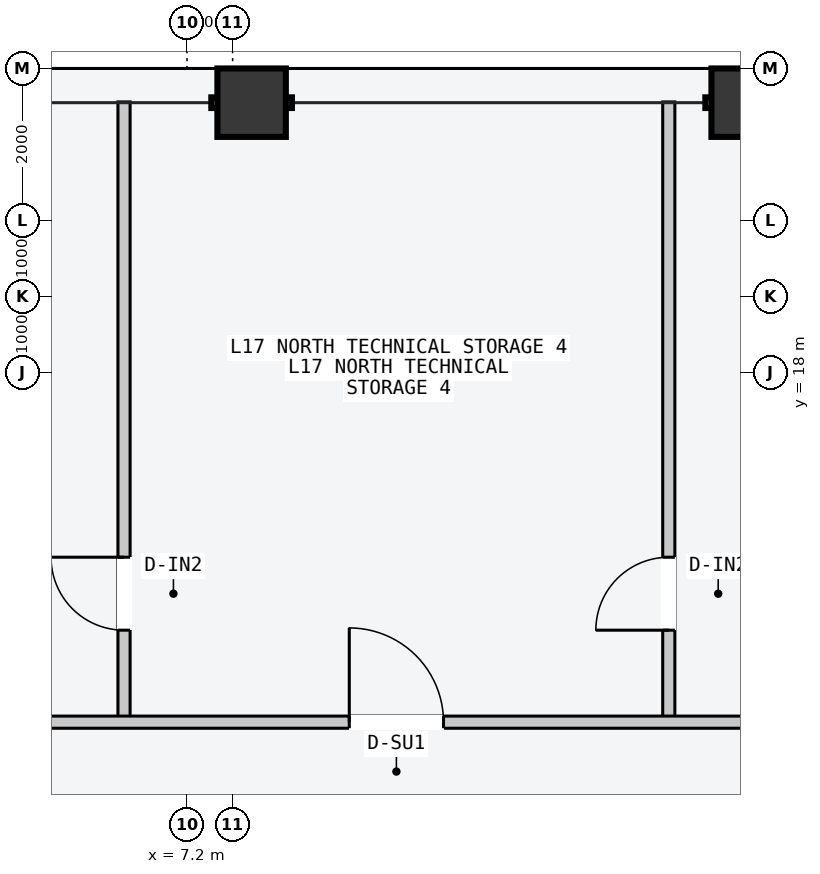
"""IFC4 building model, lengths in metres.
Left out: names, types, materials, properties, quantities, classifications, styles, units other than length and angle.
Written with IfcOpenShell. Run it as: python <this file> out.ifc"""

import sys

from ifc_helpers import new_model, si_unit, direction, frame, frame_2d, origin, origin_2d, place, context, subcontext, project, spatial, rectangle, hollow_rectangle, extrude, element, fill, save


model = new_model("IFC4")
c1 = context("Model", 3, precision=1e-05, world=origin(), true_north=direction((0.0, 1.0)))
c2 = subcontext(c1, "Body", "Model", "MODEL_VIEW")
j1 = project(units=[si_unit("LENGTHUNIT", "METRE"), si_unit("PLANEANGLEUNIT", "RADIAN")], contexts=[c1])
p1 = place(None, origin())
s1 = spatial("IfcSite", under=j1, at=p1, CompositionType="ELEMENT")
p2 = place(p1, origin())
s2 = spatial("IfcBuilding", under=s1, at=p2, CompositionType="ELEMENT")
p3 = place(p2, frame((0.0, 0.0, 67.2)))
s3 = spatial("IfcBuildingStorey", under=s2, at=p3, CompositionType="ELEMENT", Elevation=67.2)
for number, where, z_axis, x_axis in (
    (1, (8.05, 21.55, 0.0), (0.0, 0.0, 1.0), (1.0, 0.0, 0.0)),
    (2, (14.55, 21.55, 0.0), (0.0, 0.0, 1.0), (1.0, 0.0, 0.0)),
):
    element("IfcColumn", number, at=place(p3, frame(where, z_axis=z_axis, x_axis=x_axis)), inside=s3, PredefinedType="COLUMN", context=c2, shape_type="SweptSolid", body=[
        extrude(hollow_rectangle(XDim=0.9, YDim=0.9, WallThickness=0.045, at=origin_2d()), origin(), (0.0, 0.0, 1.0), 3.6),
    ])
p4 = place(p3, frame((6.371, 13.46, 0.0), z_axis=(0.0, 0.0, 1.0), x_axis=(0.0, 1.0, 0.0)))
e3 = element("IfcWall", 3, at=p4, inside=s3, PredefinedType="PARTITIONING", context=c2, shape_type="SweptSolid", body=[
    extrude(rectangle(XDim=8.1, YDim=0.16, at=frame_2d((4.05, 0.0))), origin(), (0.0, 0.0, 1.0), 3.4),
])
p5 = place(p4, frame((1.15, 0.0, 0.0)))
e4 = element("IfcOpeningElement", 4, at=p5, cuts=e3, PredefinedType="OPENING", context=c2, shape_type="SweptSolid", body=[
    extrude(rectangle(XDim=0.96, YDim=2.18, at=frame_2d((0.48, 1.09))), frame((0.0, 0.09, 0.0), z_axis=(0.0, -1.0, 0.0), x_axis=(1.0, 0.0, 0.0)), (0.0, 0.0, 1.0), 0.18),
])
p6 = place(p3, frame((13.539, 13.46, 0.0), z_axis=(0.0, 0.0, 1.0), x_axis=(0.0, 1.0, 0.0)))
e5 = element("IfcWall", 5, at=p6, inside=s3, PredefinedType="PARTITIONING", context=c2, shape_type="SweptSolid", body=[
    extrude(rectangle(XDim=8.1, YDim=0.16, at=frame_2d((4.05, 0.0))), origin(), (0.0, 0.0, 1.0), 3.4),
])
p7 = place(p6, frame((1.15, 0.0, 0.0)))
e6 = element("IfcOpeningElement", 6, at=p7, cuts=e5, PredefinedType="OPENING", context=c2, shape_type="SweptSolid", body=[
    extrude(rectangle(XDim=0.96, YDim=2.18, at=frame_2d((0.48, 1.09))), frame((0.0, 0.09, 0.0), z_axis=(0.0, -1.0, 0.0), x_axis=(1.0, 0.0, 0.0)), (0.0, 0.0, 1.0), 0.18),
])
p8 = place(p3, frame((-19.2, 13.4, 0.0), z_axis=(0.0, 0.0, 1.0), x_axis=(1.0, 0.0, 0.0)))
e7 = element("IfcWall", 7, at=p8, inside=s3, PredefinedType="PARTITIONING", context=c2, shape_type="SweptSolid", body=[
    extrude(rectangle(XDim=38.4, YDim=0.16, at=frame_2d((19.2, 0.0))), origin(), (0.0, 0.0, 1.0), 3.4),
])
p9 = place(p8, frame((4.143, 0.0, 0.0)))
e8 = element("IfcOpeningElement", 8, at=p9, cuts=e7, PredefinedType="OPENING", context=c2, shape_type="SweptSolid", body=[
    extrude(rectangle(XDim=0.96, YDim=2.18, at=frame_2d((0.48, 1.09))), frame((0.0, 0.09, 0.0), z_axis=(0.0, -1.0, 0.0), x_axis=(1.0, 0.0, 0.0)), (0.0, 0.0, 1.0), 0.18),
])
p10 = place(p8, frame((13.115, 0.0, 0.0)))
e9 = element("IfcOpeningElement", 9, at=p10, cuts=e7, PredefinedType="OPENING", context=c2, shape_type="SweptSolid", body=[
    extrude(rectangle(XDim=1.02, YDim=2.2, at=frame_2d((0.51, 1.1))), frame((0.0, 0.09, 0.0), z_axis=(0.0, -1.0, 0.0), x_axis=(1.0, 0.0, 0.0)), (0.0, 0.0, 1.0), 0.18),
])
p11 = place(p8, frame((21.258, 0.0, 0.0)))
e10 = element("IfcOpeningElement", 10, at=p11, cuts=e7, PredefinedType="OPENING", context=c2, shape_type="SweptSolid", body=[
    extrude(rectangle(XDim=1.06, YDim=2.2, at=frame_2d((0.53, 1.1))), frame((0.0, 0.09, 0.0), z_axis=(0.0, -1.0, 0.0), x_axis=(1.0, 0.0, 0.0)), (0.0, 0.0, 1.0), 0.18),
])
p12 = place(p8, frame((28.535, 0.0, 0.0)))
e11 = element("IfcOpeningElement", 11, at=p12, cuts=e7, PredefinedType="OPENING", context=c2, shape_type="SweptSolid", body=[
    extrude(rectangle(XDim=1.24, YDim=2.24, at=frame_2d((0.62, 1.12))), frame((0.0, 0.09, 0.0), z_axis=(0.0, -1.0, 0.0), x_axis=(1.0, 0.0, 0.0)), (0.0, 0.0, 1.0), 0.18),
])
p13 = place(p8, frame((34.869, 0.0, 0.0)))
e12 = element("IfcOpeningElement", 12, at=p13, cuts=e7, PredefinedType="OPENING", context=c2, shape_type="SweptSolid", body=[
    extrude(rectangle(XDim=1.4, YDim=2.2, at=frame_2d((0.7, 1.1))), frame((0.0, 0.09, 0.0), z_axis=(0.0, -1.0, 0.0), x_axis=(1.0, 0.0, 0.0)), (0.0, 0.0, 1.0), 0.18),
])
p14 = place(p5, origin())
e13 = element("IfcDoor", 13, at=p14, inside=s3, OperationType="SINGLE_SWING_RIGHT", PredefinedType="DOOR", context=c2, shape_type="SweptSolid", body=[
    extrude(rectangle(XDim=0.96, YDim=2.18, at=frame_2d((0.48, 1.09))), frame((0.0, 0.025, 0.0), z_axis=(0.0, -1.0, 0.0), x_axis=(1.0, 0.0, 0.0)), (0.0, 0.0, 1.0), 0.05),
])
fill(e4, e13)
p15 = place(p7, origin())
e14 = element("IfcDoor", 14, at=p15, inside=s3, OperationType="SINGLE_SWING_LEFT", PredefinedType="DOOR", context=c2, shape_type="SweptSolid", body=[
    extrude(rectangle(XDim=0.96, YDim=2.18, at=frame_2d((0.48, 1.09))), frame((0.0, 0.025, 0.0), z_axis=(0.0, -1.0, 0.0), x_axis=(1.0, 0.0, 0.0)), (0.0, 0.0, 1.0), 0.05),
])
fill(e6, e14)
p16 = place(p12, origin())
e15 = element("IfcDoor", 15, at=p16, inside=s3, OperationType="SINGLE_SWING_LEFT", PredefinedType="DOOR", context=c2, shape_type="SweptSolid", body=[
    extrude(rectangle(XDim=1.24, YDim=2.24, at=frame_2d((0.62, 1.12))), frame((0.0, 0.025, 0.0), z_axis=(0.0, -1.0, 0.0), x_axis=(1.0, 0.0, 0.0)), (0.0, 0.0, 1.0), 0.05),
])
fill(e11, e15)
save(model, sys.argv[1])
